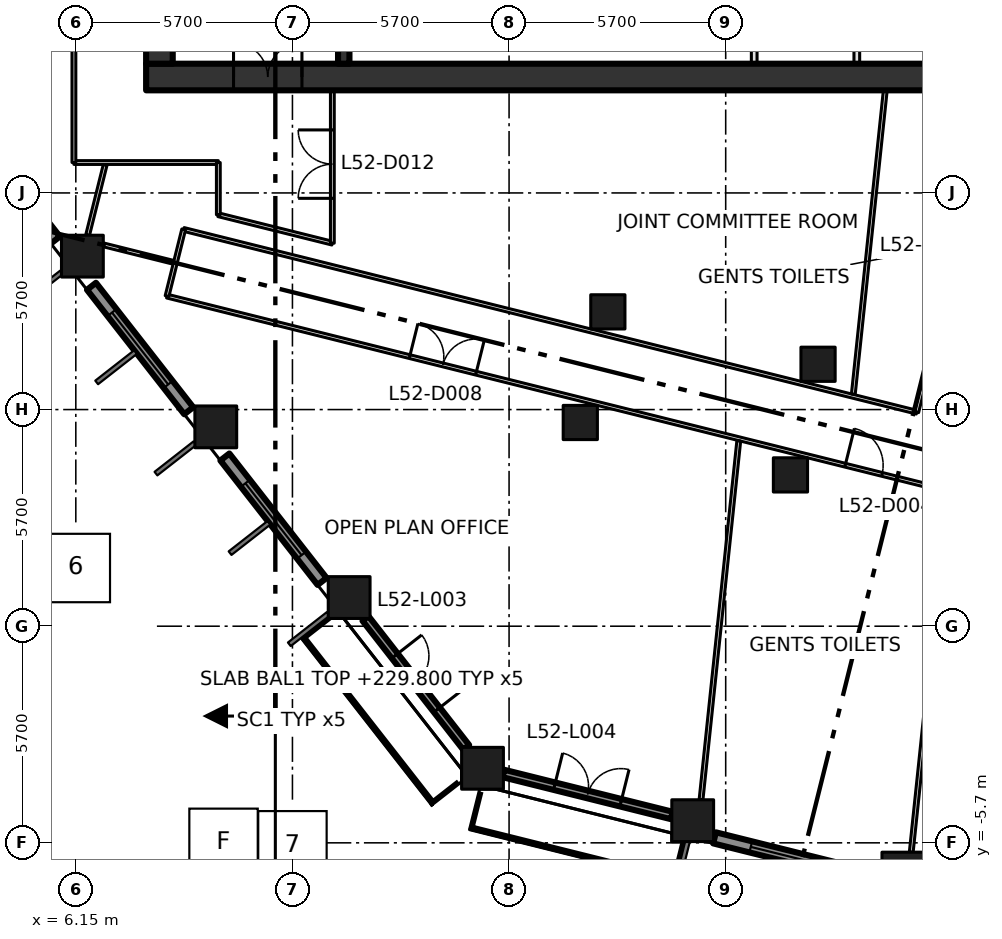
"""IFC4 building model, lengths in metres.
Left out: names, types, materials, properties, quantities, classifications, styles, units other than length and angle.
Written with IfcOpenShell. Run it as: python <this file> out.ifc"""

import sys

from ifc_helpers import new_model, si_unit, direction, frame, frame_2d, origin, origin_2d, place, context, subcontext, project, spatial, rectangle, extrude, element, fill, save


model = new_model("IFC4")
c1 = context("Model", 3, precision=1e-05, world=origin(), true_north=direction((0.0, 1.0)))
c2 = subcontext(c1, "Body", "Model", "MODEL_VIEW")
j1 = project(units=[si_unit("LENGTHUNIT", "METRE"), si_unit("PLANEANGLEUNIT", "RADIAN")], contexts=[c1])
p1 = place(None, origin())
s1 = spatial("IfcSite", under=j1, at=p1, CompositionType="ELEMENT")
p2 = place(p1, origin())
s2 = spatial("IfcBuilding", under=s1, at=p2, CompositionType="ELEMENT")
p3 = place(p2, frame((0.0, 0.0, 229.8)))
s3 = spatial("IfcBuildingStorey", under=s2, at=p3, CompositionType="ELEMENT", Elevation=229.8)
for number, where, z_axis, x_axis in (
    (1, (16.851, -3.738, 0.0), (0.0, 0.0, 1.0), (1.0, 0.0, 0.0)),
    (2, (13.342, 0.754, 0.0), (0.0, 0.0, 1.0), (1.0, 0.0, 0.0)),
    (3, (9.833, 5.245, 0.0), (0.0, 0.0, 1.0), (1.0, 0.0, 0.0)),
    (4, (6.323, 9.737, 0.0), (0.0, 0.0, 1.0), (1.0, 0.0, 0.0)),
    (5, (22.382, -5.117, 0.0), (0.0, 0.0, 1.0), (1.0, 0.0, 0.0)),
    (6, (27.912, -6.496, 0.0), (0.0, 0.0, 1.0), (1.0, 0.0, 0.0)),
):
    element("IfcColumn", number, at=place(p3, frame(where, z_axis=z_axis, x_axis=x_axis)), inside=s3, PredefinedType="COLUMN", context=c2, shape_type="SweptSolid", body=[
        extrude(rectangle(XDim=1.1, YDim=1.1, at=origin_2d()), origin(), (0.0, 0.0, 1.0), 4.2),
    ])
for number, where, z_axis, x_axis in (
    (7, (19.424, 5.36, 0.0), (0.0, 0.0, 1.0), (1.0, 0.0, 0.0)),
    (8, (24.954, 3.981, 0.0), (0.0, 0.0, 1.0), (1.0, 0.0, 0.0)),
    (9, (20.149, 8.271, 0.0), (0.0, 0.0, 1.0), (1.0, 0.0, 0.0)),
    (10, (25.68, 6.892, 0.0), (0.0, 0.0, 1.0), (1.0, 0.0, 0.0)),
):
    element("IfcColumn", number, at=place(p3, frame(where, z_axis=z_axis, x_axis=x_axis)), inside=s3, PredefinedType="COLUMN", context=c2, shape_type="SweptSolid", body=[
        extrude(rectangle(XDim=0.9, YDim=0.9, at=origin_2d()), origin(), (0.0, 0.0, 1.0), 4.2),
    ])
p4 = place(p3, frame((8.0, 14.45, -0.3), z_axis=(0.0, 0.0, 1.0), x_axis=(1.0, 0.0, 0.0)))
e11 = element("IfcWall", 11, at=p4, inside=s3, PredefinedType="SHEAR", context=c2, shape_type="SweptSolid", body=[
    extrude(rectangle(XDim=22.8, YDim=0.7, at=frame_2d((11.4, 0.0))), origin(), (0.0, 0.0, 1.0), 4.2),
])
p5 = place(p4, frame((2.3, 0.0, 0.3)))
e12 = element("IfcOpeningElement", 12, at=p5, cuts=e11, PredefinedType="OPENING", context=c2, shape_type="SweptSolid", body=[
    extrude(rectangle(XDim=1.8, YDim=2.1, at=frame_2d((0.9, 1.05))), frame((0.0, 0.36, 0.0), z_axis=(0.0, -1.0, 0.0), x_axis=(1.0, 0.0, 0.0)), (0.0, 0.0, 1.0), 0.72),
])
p6 = place(p3, frame((8.35, 14.8, -0.3), z_axis=(0.0, 0.0, 1.0), x_axis=(0.0, 1.0, 0.0)))
e13 = element("IfcWall", 13, at=p6, inside=s3, PredefinedType="SHEAR", context=c2, shape_type="SweptSolid", body=[
    extrude(rectangle(XDim=20.9, YDim=0.7, at=frame_2d((10.45, 0.0))), origin(), (0.0, 0.0, 1.0), 4.2),
])
p7 = place(p3, frame((13.2, 14.8, 0.0), z_axis=(0.0, 0.0, 1.0), x_axis=(0.0, 1.0, 0.0)))
e14 = element("IfcWall", 14, at=p7, inside=s3, PredefinedType="SHEAR", context=c2, shape_type="SweptSolid", body=[
    extrude(rectangle(XDim=20.9, YDim=0.3, at=frame_2d((10.45, 0.0))), origin(), (0.0, 0.0, 1.0), 3.9),
])
p8 = place(p7, frame((3.5, 0.0, 0.0)))
e15 = element("IfcOpeningElement", 15, at=p8, cuts=e14, PredefinedType="OPENING", context=c2, shape_type="SweptSolid", body=[
    extrude(rectangle(XDim=1.8, YDim=2.1, at=frame_2d((0.9, 1.05))), frame((0.0, 0.16, 0.0), z_axis=(0.0, -1.0, 0.0), x_axis=(1.0, 0.0, 0.0)), (0.0, 0.0, 1.0), 0.32),
])
p9 = place(p7, frame((11.6, 0.0, 0.0)))
e16 = element("IfcOpeningElement", 16, at=p9, cuts=e14, PredefinedType="OPENING", context=c2, shape_type="SweptSolid", body=[
    extrude(rectangle(XDim=1.2, YDim=2.1, at=frame_2d((0.6, 1.05))), frame((0.0, 0.16, 0.0), z_axis=(0.0, -1.0, 0.0), x_axis=(1.0, 0.0, 0.0)), (0.0, 0.0, 1.0), 0.32),
])
for number, where, z_axis, x_axis in (
    (17, (24.0, 14.8, 0.0), (0.0, 0.0, 1.0), (0.0, 1.0, 0.0)),
    (18, (26.7, 14.8, 0.0), (0.0, 0.0, 1.0), (0.0, 1.0, 0.0)),
):
    element("IfcWall", number, at=place(p3, frame(where, z_axis=z_axis, x_axis=x_axis)), inside=s3, PredefinedType="PARTITIONING", context=c2, shape_type="SweptSolid", body=[
        extrude(rectangle(XDim=2.825, YDim=0.15, at=frame_2d((1.413, 0.0))), origin(), (0.0, 0.0, 1.0), 3.9),
    ])
p10 = place(p3, frame((3.053, 13.436, 0.0), z_axis=(0.0, 0.0, 1.0), x_axis=(0.615699893917, -0.787980736205, 0.0)))
e19 = element("IfcWall", 19, at=p10, inside=s3, PredefinedType="SOLIDWALL", context=c2, shape_type="SweptSolid", body=[
    extrude(rectangle(XDim=4.156, YDim=0.3, at=frame_2d((2.078, 0.0))), origin(), (0.0, 0.0, 1.0), 3.15),
])
p11 = place(p10, frame((0.878, 0.0, 0.8)))
e20 = element("IfcOpeningElement", 20, at=p11, cuts=e19, PredefinedType="OPENING", context=c2, shape_type="SweptSolid", body=[
    extrude(rectangle(XDim=2.4, YDim=2.1, at=frame_2d((1.2, 1.05))), frame((0.0, 0.16, 0.0), z_axis=(0.0, -1.0, 0.0), x_axis=(1.0, 0.0, 0.0)), (0.0, 0.0, 1.0), 0.32),
])
p12 = place(p3, frame((6.562, 8.944, 0.0), z_axis=(0.0, 0.0, 1.0), x_axis=(0.615699893917, -0.787980736205, 0.0)))
e21 = element("IfcWall", 21, at=p12, inside=s3, PredefinedType="SOLIDWALL", context=c2, shape_type="SweptSolid", body=[
    extrude(rectangle(XDim=4.156, YDim=0.3, at=frame_2d((2.078, 0.0))), origin(), (0.0, 0.0, 1.0), 3.15),
])
p13 = place(p12, frame((0.878, 0.0, 0.8)))
e22 = element("IfcOpeningElement", 22, at=p13, cuts=e21, PredefinedType="OPENING", context=c2, shape_type="SweptSolid", body=[
    extrude(rectangle(XDim=2.4, YDim=2.1, at=frame_2d((1.2, 1.05))), frame((0.0, 0.16, 0.0), z_axis=(0.0, -1.0, 0.0), x_axis=(1.0, 0.0, 0.0)), (0.0, 0.0, 1.0), 0.32),
])
p14 = place(p3, frame((10.072, 4.452, 0.0), z_axis=(0.0, 0.0, 1.0), x_axis=(0.615660006568, -0.788011901124, 0.0)))
e23 = element("IfcWall", 23, at=p14, inside=s3, PredefinedType="SOLIDWALL", context=c2, shape_type="SweptSolid", body=[
    extrude(rectangle(XDim=4.155, YDim=0.3, at=frame_2d((2.077, 0.0))), origin(), (0.0, 0.0, 1.0), 3.15),
])
p15 = place(p14, frame((0.878, 0.0, 0.8)))
e24 = element("IfcOpeningElement", 24, at=p15, cuts=e23, PredefinedType="OPENING", context=c2, shape_type="SweptSolid", body=[
    extrude(rectangle(XDim=2.4, YDim=2.1, at=frame_2d((1.2, 1.05))), frame((0.0, 0.16, 0.0), z_axis=(0.0, -1.0, 0.0), x_axis=(1.0, 0.0, 0.0)), (0.0, 0.0, 1.0), 0.32),
])
p16 = place(p3, frame((13.772, 0.204, 0.0), z_axis=(0.0, 0.0, 1.0), x_axis=(0.615478906808, -0.788153357713, 0.0)))
e25 = element("IfcWall", 25, at=p16, inside=s3, PredefinedType="SOLIDWALL", context=c2, shape_type="SweptSolid", body=[
    extrude(rectangle(XDim=4.304, YDim=0.2, at=frame_2d((2.152, 0.0))), origin(), (0.0, 0.0, 1.0), 3.15),
])
p17 = place(p16, frame((1.252, 0.0, 0.0)))
e26 = element("IfcOpeningElement", 26, at=p17, cuts=e25, PredefinedType="OPENING", context=c2, shape_type="SweptSolid", body=[
    extrude(rectangle(XDim=1.8, YDim=2.9, at=frame_2d((0.9, 1.45))), frame((0.0, 0.11, 0.0), z_axis=(0.0, -1.0, 0.0), x_axis=(1.0, 0.0, 0.0)), (0.0, 0.0, 1.0), 0.22),
])
p18 = place(p3, frame((12.398, -0.199, 0.0), z_axis=(0.0, 0.0, 1.0), x_axis=(0.615638738903, -0.788028516719, 0.0)))
e27 = element("IfcWall", 27, at=p18, inside=s3, PredefinedType="SOLIDWALL", context=c2, shape_type="SweptSolid", body=[
    extrude(rectangle(XDim=5.36, YDim=0.4, at=frame_2d((2.68, 0.0))), origin(), (0.0, 0.0, 1.0), 0.3),
])
p19 = place(p3, frame((17.401, -3.875, 0.0), z_axis=(0.0, 0.0, 1.0), x_axis=(0.970286982272, -0.241956963183, 0.0)))
e28 = element("IfcWall", 28, at=p19, inside=s3, PredefinedType="SOLIDWALL", context=c2, shape_type="SweptSolid", body=[
    extrude(rectangle(XDim=4.567, YDim=0.2, at=frame_2d((2.283, 0.0))), origin(), (0.0, 0.0, 1.0), 3.15),
])
p20 = place(p19, frame((1.383, 0.0, 0.0)))
e29 = element("IfcOpeningElement", 29, at=p20, cuts=e28, PredefinedType="OPENING", context=c2, shape_type="SweptSolid", body=[
    extrude(rectangle(XDim=1.8, YDim=2.9, at=frame_2d((0.9, 1.45))), frame((0.0, 0.11, 0.0), z_axis=(0.0, -1.0, 0.0), x_axis=(1.0, 0.0, 0.0)), (0.0, 0.0, 1.0), 0.22),
])
p21 = place(p3, frame((16.694, -5.069, 0.0), z_axis=(0.0, 0.0, 1.0), x_axis=(0.970289679319, -0.241946147329, 0.0)))
e30 = element("IfcWall", 30, at=p21, inside=s3, PredefinedType="SOLIDWALL", context=c2, shape_type="SweptSolid", body=[
    extrude(rectangle(XDim=5.36, YDim=0.4, at=frame_2d((2.68, 0.0))), origin(), (0.0, 0.0, 1.0), 0.3),
])
p22 = place(p3, frame((22.956, -5.569, 0.0), z_axis=(0.0, 0.0, 1.0), x_axis=(0.970323116569, -0.241812012628, 0.0)))
e31 = element("IfcWall", 31, at=p22, inside=s3, PredefinedType="SOLIDWALL", context=c2, shape_type="SweptSolid", body=[
    extrude(rectangle(XDim=4.367, YDim=0.3, at=frame_2d((2.183, 0.0))), origin(), (0.0, 0.0, 1.0), 3.15),
])
p23 = place(p22, frame((0.983, 0.0, 0.8)))
e32 = element("IfcOpeningElement", 32, at=p23, cuts=e31, PredefinedType="OPENING", context=c2, shape_type="SweptSolid", body=[
    extrude(rectangle(XDim=2.4, YDim=2.1, at=frame_2d((1.2, 1.05))), frame((0.0, 0.16, 0.0), z_axis=(0.0, -1.0, 0.0), x_axis=(1.0, 0.0, 0.0)), (0.0, 0.0, 1.0), 0.32),
])
p24 = place(p3, frame((6.1, 12.2, 0.0), z_axis=(0.0, 0.0, 1.0), x_axis=(1.0, 0.0, 0.0)))
e33 = element("IfcWall", 33, at=p24, inside=s3, PredefinedType="PARTITIONING", context=c2, shape_type="SweptSolid", body=[
    extrude(rectangle(XDim=3.8, YDim=0.1, at=frame_2d((1.9, 0.0))), origin(), (0.0, 0.0, 1.0), 3.9),
])
p25 = place(p3, frame((6.1, 38.9, 0.0), z_axis=(0.0, 0.0, 1.0), x_axis=(0.0, -1.0, 0.0)))
e34 = element("IfcWall", 34, at=p25, inside=s3, PredefinedType="PARTITIONING", context=c2, shape_type="SweptSolid", body=[
    extrude(rectangle(XDim=26.7, YDim=0.1, at=frame_2d((13.35, 0.0))), origin(), (0.0, 0.0, 1.0), 3.9),
])
p26 = place(p25, frame((17.936, 0.0, 0.0)))
e35 = element("IfcOpeningElement", 35, at=p26, cuts=e34, PredefinedType="OPENING", context=c2, shape_type="SweptSolid", body=[
    extrude(rectangle(XDim=1.0, YDim=2.1, at=frame_2d((0.5, 1.05))), frame((0.0, 0.06, 0.0), z_axis=(0.0, -1.0, 0.0), x_axis=(1.0, 0.0, 0.0)), (0.0, 0.0, 1.0), 0.12),
])
p27 = place(p3, frame((8.55, 8.685, 0.0), z_axis=(0.0, 0.0, 1.0), x_axis=(0.970297101369, -0.241916380335, 0.0)))
e36 = element("IfcWall", 36, at=p27, inside=s3, PredefinedType="PARTITIONING", context=c2, shape_type="SweptSolid", body=[
    extrude(rectangle(XDim=51.675, YDim=0.1, at=frame_2d((25.837, 0.0))), origin(), (0.0, 0.0, 1.0), 3.9),
])
p28 = place(p27, frame((18.391, 0.0, 0.0)))
e37 = element("IfcOpeningElement", 37, at=p28, cuts=e36, PredefinedType="OPENING", context=c2, shape_type="SweptSolid", body=[
    extrude(rectangle(XDim=1.0, YDim=2.1, at=frame_2d((0.5, 1.05))), frame((0.0, 0.06, 0.0), z_axis=(0.0, -1.0, 0.0), x_axis=(1.0, 0.0, 0.0)), (0.0, 0.0, 1.0), 0.12),
])
p29 = place(p27, frame((24.69, 0.0, 0.0)))
e38 = element("IfcOpeningElement", 38, at=p29, cuts=e36, PredefinedType="OPENING", context=c2, shape_type="SweptSolid", body=[
    extrude(rectangle(XDim=1.0, YDim=2.1, at=frame_2d((0.5, 1.05))), frame((0.0, 0.06, 0.0), z_axis=(0.0, -1.0, 0.0), x_axis=(1.0, 0.0, 0.0)), (0.0, 0.0, 1.0), 0.12),
])
p30 = place(p27, frame((29.99, 0.0, 0.0)))
e39 = element("IfcOpeningElement", 39, at=p30, cuts=e36, PredefinedType="OPENING", context=c2, shape_type="SweptSolid", body=[
    extrude(rectangle(XDim=1.8, YDim=2.1, at=frame_2d((0.9, 1.05))), frame((0.0, 0.06, 0.0), z_axis=(0.0, -1.0, 0.0), x_axis=(1.0, 0.0, 0.0)), (0.0, 0.0, 1.0), 0.12),
])
p31 = place(p27, frame((6.58, 0.0, 0.0)))
e40 = element("IfcOpeningElement", 40, at=p31, cuts=e36, PredefinedType="OPENING", context=c2, shape_type="SweptSolid", body=[
    extrude(rectangle(XDim=1.8, YDim=2.1, at=frame_2d((0.9, 1.05))), frame((0.0, 0.06, 0.0), z_axis=(0.0, -1.0, 0.0), x_axis=(1.0, 0.0, 0.0)), (0.0, 0.0, 1.0), 0.12),
])
p32 = place(p3, frame((8.988, 10.44, 0.0), z_axis=(0.0, 0.0, 1.0), x_axis=(0.970301223092, -0.241899848006, 0.0)))
e41 = element("IfcWall", 41, at=p32, inside=s3, PredefinedType="PARTITIONING", context=c2, shape_type="SweptSolid", body=[
    extrude(rectangle(XDim=19.879, YDim=0.1, at=frame_2d((9.94, 0.0))), origin(), (0.0, 0.0, 1.0), 3.9),
])
p33 = place(p3, frame((8.988, 10.44, 0.0), z_axis=(0.0, 0.0, 1.0), x_axis=(-0.242154485745, -0.970237705428, 0.0)))
e42 = element("IfcWall", 42, at=p33, inside=s3, PredefinedType="PARTITIONING", context=c2, shape_type="SweptSolid", body=[
    extrude(rectangle(XDim=1.809, YDim=0.1, at=frame_2d((0.904, 0.0))), origin(), (0.0, 0.0, 1.0), 3.9),
])
p34 = place(p3, frame((9.9, 10.826, 0.0), z_axis=(0.0, 0.0, 1.0), x_axis=(0.970290953223, -0.241941038466, 0.0)))
e43 = element("IfcWall", 43, at=p34, inside=s3, PredefinedType="PARTITIONING", context=c2, shape_type="SweptSolid", body=[
    extrude(rectangle(XDim=3.092, YDim=0.1, at=frame_2d((1.546, 0.0))), origin(), (0.0, 0.0, 1.0), 3.9),
])
p35 = place(p3, frame((9.9, 12.2, 0.0), z_axis=(0.0, 0.0, 1.0), x_axis=(0.0, -1.0, 0.0)))
e44 = element("IfcWall", 44, at=p35, inside=s3, PredefinedType="PARTITIONING", context=c2, shape_type="SweptSolid", body=[
    extrude(rectangle(XDim=1.374, YDim=0.1, at=frame_2d((0.687, 0.0))), origin(), (0.0, 0.0, 1.0), 3.9),
])
p36 = place(p3, frame((12.9, 10.078, 0.0), z_axis=(0.0, 0.0, 1.0), x_axis=(0.0, 1.0, 0.0)))
e45 = element("IfcWall", 45, at=p36, inside=s3, PredefinedType="PARTITIONING", context=c2, shape_type="SweptSolid", body=[
    extrude(rectangle(XDim=4.022, YDim=0.1, at=frame_2d((2.011, 0.0))), origin(), (0.0, 0.0, 1.0), 3.9),
])
p37 = place(p36, frame((1.18, 0.0, 0.0)))
e46 = element("IfcOpeningElement", 46, at=p37, cuts=e45, PredefinedType="OPENING", context=c2, shape_type="SweptSolid", body=[
    extrude(rectangle(XDim=1.8, YDim=2.1, at=frame_2d((0.9, 1.05))), frame((0.0, 0.06, 0.0), z_axis=(0.0, -1.0, 0.0), x_axis=(1.0, 0.0, 0.0)), (0.0, 0.0, 1.0), 0.12),
])
p38 = place(p3, frame((30.259, 13.583, 0.0), z_axis=(0.0, 0.0, 1.0), x_axis=(-0.241841612879, -0.970315739479, 0.0)))
e47 = element("IfcWall", 47, at=p38, inside=s3, PredefinedType="PARTITIONING", context=c2, shape_type="SweptSolid", body=[
    extrude(rectangle(XDim=8.195, YDim=0.1, at=frame_2d((4.098, 0.0))), origin(), (0.0, 0.0, 1.0), 3.9),
])
p39 = place(p38, frame((3.38, 0.0, 0.0)))
e48 = element("IfcOpeningElement", 48, at=p39, cuts=e47, PredefinedType="OPENING", context=c2, shape_type="SweptSolid", body=[
    extrude(rectangle(XDim=1.0, YDim=2.1, at=frame_2d((0.5, 1.05))), frame((0.0, 0.06, 0.0), z_axis=(0.0, -1.0, 0.0), x_axis=(1.0, 0.0, 0.0)), (0.0, 0.0, 1.0), 0.12),
])
p40 = place(p3, frame((6.922, 12.138, 0.0), z_axis=(0.0, 0.0, 1.0), x_axis=(-0.242264600824, -0.970210215978, 0.0)))
e49 = element("IfcWall", 49, at=p40, inside=s3, PredefinedType="PARTITIONING", context=c2, shape_type="SweptSolid", body=[
    extrude(rectangle(XDim=1.908, YDim=0.1, at=frame_2d((0.954, 0.0))), origin(), (0.0, 0.0, 1.0), 3.9),
])
p41 = place(p3, frame((8.72, 9.574, 0.0), z_axis=(0.0, 0.0, 1.0), x_axis=(-0.970240497311, 0.242143299263, 0.0)))
e50 = element("IfcWall", 50, at=p41, inside=s3, PredefinedType="PARTITIONING", context=c2, shape_type="SweptSolid", body=[
    extrude(rectangle(XDim=1.904, YDim=0.1, at=frame_2d((0.952, 0.0))), origin(), (0.0, 0.0, 1.0), 3.9),
])
p42 = place(p3, frame((22.601, -4.567, 0.0), z_axis=(0.0, 0.0, 1.0), x_axis=(0.104573690763, 0.994517140727, 0.0)))
e51 = element("IfcWall", 51, at=p42, inside=s3, PredefinedType="PARTITIONING", context=c2, shape_type="SweptSolid", body=[
    extrude(rectangle(XDim=9.495, YDim=0.1, at=frame_2d((4.748, 0.0))), origin(), (0.0, 0.0, 1.0), 3.9),
])
p43 = place(p3, frame((26.608, 6.105, 0.0), z_axis=(0.0, 0.0, 1.0), x_axis=(0.104619970127, 0.994512273353, 0.0)))
e52 = element("IfcWall", 52, at=p43, inside=s3, PredefinedType="PARTITIONING", context=c2, shape_type="SweptSolid", body=[
    extrude(rectangle(XDim=8.039, YDim=0.1, at=frame_2d((4.02, 0.0))), origin(), (0.0, 0.0, 1.0), 3.9),
])
p44 = place(p3, frame((28.132, -5.946, 0.0), z_axis=(0.0, 0.0, 1.0), x_axis=(0.104469291407, 0.994528112802, 0.0)))
e53 = element("IfcWall", 53, at=p44, inside=s3, PredefinedType="PARTITIONING", context=c2, shape_type="SweptSolid", body=[
    extrude(rectangle(XDim=9.495, YDim=0.1, at=frame_2d((4.748, 0.0))), origin(), (0.0, 0.0, 1.0), 3.9),
])
p45 = place(p5, origin())
e54 = element("IfcDoor", 54, at=p45, inside=s3, OperationType="DOUBLE_DOOR_SINGLE_SWING", PredefinedType="DOOR", context=c2, shape_type="SweptSolid", body=[
    extrude(rectangle(XDim=1.8, YDim=2.1, at=frame_2d((0.9, 1.05))), frame((0.0, 0.025, 0.0), z_axis=(0.0, -1.0, 0.0), x_axis=(1.0, 0.0, 0.0)), (0.0, 0.0, 1.0), 0.05),
])
fill(e12, e54)
p46 = place(p13, origin())
e55 = element("IfcWindow", 55, at=p46, inside=s3, PartitioningType="DOUBLE_PANEL_VERTICAL", PredefinedType="WINDOW", context=c2, shape_type="SweptSolid", body=[
    extrude(rectangle(XDim=2.4, YDim=2.1, at=frame_2d((1.2, 1.05))), frame((0.0, 0.03, 0.0), z_axis=(0.0, -1.0, 0.0), x_axis=(1.0, 0.0, 0.0)), (0.0, 0.0, 1.0), 0.06),
])
fill(e22, e55)
p47 = place(p15, origin())
e56 = element("IfcWindow", 56, at=p47, inside=s3, PartitioningType="DOUBLE_PANEL_VERTICAL", PredefinedType="WINDOW", context=c2, shape_type="SweptSolid", body=[
    extrude(rectangle(XDim=2.4, YDim=2.1, at=frame_2d((1.2, 1.05))), frame((0.0, 0.03, 0.0), z_axis=(0.0, -1.0, 0.0), x_axis=(1.0, 0.0, 0.0)), (0.0, 0.0, 1.0), 0.06),
])
fill(e24, e56)
p48 = place(p17, origin())
e57 = element("IfcDoor", 57, at=p48, inside=s3, OperationType="DOUBLE_DOOR_SINGLE_SWING", PredefinedType="DOOR", context=c2, shape_type="SweptSolid", body=[
    extrude(rectangle(XDim=1.8, YDim=2.9, at=frame_2d((0.9, 1.45))), frame((0.0, 0.025, 0.0), z_axis=(0.0, -1.0, 0.0), x_axis=(1.0, 0.0, 0.0)), (0.0, 0.0, 1.0), 0.05),
])
fill(e26, e57)
p49 = place(p20, origin())
e58 = element("IfcDoor", 58, at=p49, inside=s3, OperationType="DOUBLE_DOOR_SINGLE_SWING", PredefinedType="DOOR", context=c2, shape_type="SweptSolid", body=[
    extrude(rectangle(XDim=1.8, YDim=2.9, at=frame_2d((0.9, 1.45))), frame((0.0, 0.025, 0.0), z_axis=(0.0, -1.0, 0.0), x_axis=(1.0, 0.0, 0.0)), (0.0, 0.0, 1.0), 0.05),
])
fill(e29, e58)
p50 = place(p23, origin())
e59 = element("IfcWindow", 59, at=p50, inside=s3, PartitioningType="DOUBLE_PANEL_VERTICAL", PredefinedType="WINDOW", context=c2, shape_type="SweptSolid", body=[
    extrude(rectangle(XDim=2.4, YDim=2.1, at=frame_2d((1.2, 1.05))), frame((0.0, 0.03, 0.0), z_axis=(0.0, -1.0, 0.0), x_axis=(1.0, 0.0, 0.0)), (0.0, 0.0, 1.0), 0.06),
])
fill(e32, e59)
p51 = place(p28, origin())
e60 = element("IfcDoor", 60, at=p51, inside=s3, OperationType="SINGLE_SWING_LEFT", PredefinedType="DOOR", context=c2, shape_type="SweptSolid", body=[
    extrude(rectangle(XDim=1.0, YDim=2.1, at=frame_2d((0.5, 1.05))), frame((0.0, 0.025, 0.0), z_axis=(0.0, -1.0, 0.0), x_axis=(1.0, 0.0, 0.0)), (0.0, 0.0, 1.0), 0.05),
])
fill(e37, e60)
p52 = place(p31, origin())
e61 = element("IfcDoor", 61, at=p52, inside=s3, OperationType="DOUBLE_DOOR_SINGLE_SWING", PredefinedType="DOOR", context=c2, shape_type="SweptSolid", body=[
    extrude(rectangle(XDim=1.8, YDim=2.1, at=frame_2d((0.9, 1.05))), frame((0.0, 0.025, 0.0), z_axis=(0.0, -1.0, 0.0), x_axis=(1.0, 0.0, 0.0)), (0.0, 0.0, 1.0), 0.05),
])
fill(e40, e61)
p53 = place(p37, origin())
e62 = element("IfcDoor", 62, at=p53, inside=s3, OperationType="DOUBLE_DOOR_SINGLE_SWING", PredefinedType="DOOR", context=c2, shape_type="SweptSolid", body=[
    extrude(rectangle(XDim=1.8, YDim=2.1, at=frame_2d((0.9, 1.05))), frame((0.0, 0.025, 0.0), z_axis=(0.0, -1.0, 0.0), x_axis=(1.0, 0.0, 0.0)), (0.0, 0.0, 1.0), 0.05),
])
fill(e46, e62)
save(model, sys.argv[1])
